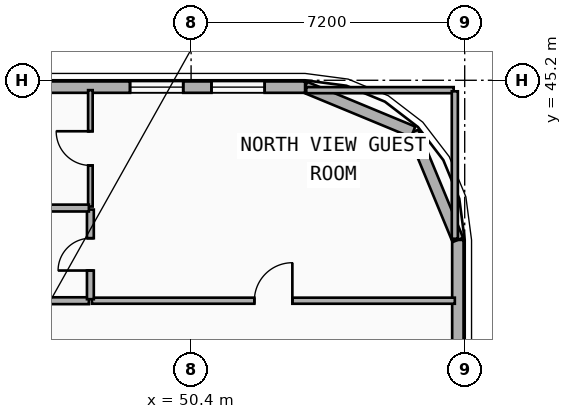
"""IFC4 building model, lengths in metres.
Left out: names, types, materials, properties, quantities, classifications, styles, units other than length and angle.
Written with IfcOpenShell. Run it as: python <this file> out.ifc"""

import sys

from ifc_helpers import new_model, si_unit, direction, frame, frame_2d, origin, place, context, subcontext, project, spatial, rectangle, extrude, element, fill, save


model = new_model("IFC4")
c1 = context("Model", 3, precision=1e-05, world=origin(), true_north=direction((0.0, 1.0)))
c2 = subcontext(c1, "Body", "Model", "MODEL_VIEW")
j1 = project(units=[si_unit("LENGTHUNIT", "METRE"), si_unit("PLANEANGLEUNIT", "RADIAN")], contexts=[c1])
p1 = place(None, origin())
s1 = spatial("IfcSite", under=j1, at=p1, CompositionType="ELEMENT")
p2 = place(p1, origin())
s2 = spatial("IfcBuilding", under=s1, at=p2, CompositionType="ELEMENT")
p3 = place(p2, frame((0.0, 0.0, 39.5)))
s3 = spatial("IfcBuildingStorey", under=s2, at=p3, CompositionType="ELEMENT", Elevation=39.5)
p4 = place(p3, frame((57.42, 41.0, 0.0), z_axis=(0.0, 0.0, 1.0), x_axis=(0.0, -1.0, 0.0)))
e1 = element("IfcWall", 1, at=p4, inside=s3, PredefinedType="SOLIDWALL", context=c2, shape_type="SweptSolid", body=[
    extrude(rectangle(XDim=15.2, YDim=0.3, at=frame_2d((7.6, 0.0))), origin(), (0.0, 0.0, 1.0), 3.24),
])
p5 = place(p4, frame((10.882, 0.0, 0.48)))
e2 = element("IfcOpeningElement", 2, at=p5, cuts=e1, PredefinedType="OPENING", context=c2, shape_type="SweptSolid", body=[
    extrude(rectangle(XDim=1.4, YDim=1.8, at=frame_2d((0.7, 0.9))), frame((0.0, 0.16, 0.0), z_axis=(0.0, -1.0, 0.0), x_axis=(1.0, 0.0, 0.0)), (0.0, 0.0, 1.0), 0.32),
])
p6 = place(p4, frame((5.621, 0.0, 0.48)))
e3 = element("IfcOpeningElement", 3, at=p6, cuts=e1, PredefinedType="OPENING", context=c2, shape_type="SweptSolid", body=[
    extrude(rectangle(XDim=1.4, YDim=1.8, at=frame_2d((0.7, 0.9))), frame((0.0, 0.16, 0.0), z_axis=(0.0, -1.0, 0.0), x_axis=(1.0, 0.0, 0.0)), (0.0, 0.0, 1.0), 0.32),
])
p7 = place(p3, frame((56.243, 43.843, 0.0), z_axis=(0.0, 0.0, 1.0), x_axis=(0.382636798336, -0.92389884758, 0.0)))
e4 = element("IfcWall", 4, at=p7, inside=s3, PredefinedType="SOLIDWALL", context=c2, shape_type="SweptSolid", body=[
    extrude(rectangle(XDim=3.077, YDim=0.3, at=frame_2d((1.538, 0.0))), origin(), (0.0, 0.0, 1.0), 3.24),
])
p8 = place(p3, frame((53.4, 45.02, 0.0), z_axis=(0.0, 0.0, 1.0), x_axis=(0.923882414032, -0.382676475685, 0.0)))
e5 = element("IfcWall", 5, at=p8, inside=s3, PredefinedType="SOLIDWALL", context=c2, shape_type="SweptSolid", body=[
    extrude(rectangle(XDim=3.077, YDim=0.3, at=frame_2d((1.539, 0.0))), origin(), (0.0, 0.0, 1.0), 3.24),
])
p9 = place(p3, frame((4.2, 45.02, 0.0), z_axis=(0.0, 0.0, 1.0), x_axis=(1.0, 0.0, 0.0)))
e6 = element("IfcWall", 6, at=p9, inside=s3, PredefinedType="SOLIDWALL", context=c2, shape_type="SweptSolid", body=[
    extrude(rectangle(XDim=49.2, YDim=0.3, at=frame_2d((24.6, 0.0))), origin(), (0.0, 0.0, 1.0), 3.24),
])
p10 = place(p9, frame((5.87, 0.0, 0.85)))
e7 = element("IfcOpeningElement", 7, at=p10, cuts=e6, PredefinedType="OPENING", context=c2, shape_type="SweptSolid", body=[
    extrude(rectangle(XDim=1.4, YDim=1.8, at=frame_2d((0.7, 0.9))), frame((0.0, 0.16, 0.0), z_axis=(0.0, -1.0, 0.0), x_axis=(1.0, 0.0, 0.0)), (0.0, 0.0, 1.0), 0.32),
])
p11 = place(p9, frame((8.481, 0.0, 0.85)))
e8 = element("IfcOpeningElement", 8, at=p11, cuts=e6, PredefinedType="OPENING", context=c2, shape_type="SweptSolid", body=[
    extrude(rectangle(XDim=1.4, YDim=1.8, at=frame_2d((0.7, 0.9))), frame((0.0, 0.16, 0.0), z_axis=(0.0, -1.0, 0.0), x_axis=(1.0, 0.0, 0.0)), (0.0, 0.0, 1.0), 0.32),
])
p12 = place(p9, frame((18.227, 0.0, 0.85)))
e9 = element("IfcOpeningElement", 9, at=p12, cuts=e6, PredefinedType="OPENING", context=c2, shape_type="SweptSolid", body=[
    extrude(rectangle(XDim=1.4, YDim=1.8, at=frame_2d((0.7, 0.9))), frame((0.0, 0.16, 0.0), z_axis=(0.0, -1.0, 0.0), x_axis=(1.0, 0.0, 0.0)), (0.0, 0.0, 1.0), 0.32),
])
p13 = place(p9, frame((21.462, 0.0, 0.85)))
e10 = element("IfcOpeningElement", 10, at=p13, cuts=e6, PredefinedType="OPENING", context=c2, shape_type="SweptSolid", body=[
    extrude(rectangle(XDim=1.4, YDim=1.8, at=frame_2d((0.7, 0.9))), frame((0.0, 0.16, 0.0), z_axis=(0.0, -1.0, 0.0), x_axis=(1.0, 0.0, 0.0)), (0.0, 0.0, 1.0), 0.32),
])
p14 = place(p9, frame((27.884, 0.0, 0.85)))
e11 = element("IfcOpeningElement", 11, at=p14, cuts=e6, PredefinedType="OPENING", context=c2, shape_type="SweptSolid", body=[
    extrude(rectangle(XDim=1.4, YDim=1.8, at=frame_2d((0.7, 0.9))), frame((0.0, 0.16, 0.0), z_axis=(0.0, -1.0, 0.0), x_axis=(1.0, 0.0, 0.0)), (0.0, 0.0, 1.0), 0.32),
])
p15 = place(p9, frame((29.867, 0.0, 0.85)))
e12 = element("IfcOpeningElement", 12, at=p15, cuts=e6, PredefinedType="OPENING", context=c2, shape_type="SweptSolid", body=[
    extrude(rectangle(XDim=1.4, YDim=1.8, at=frame_2d((0.7, 0.9))), frame((0.0, 0.16, 0.0), z_axis=(0.0, -1.0, 0.0), x_axis=(1.0, 0.0, 0.0)), (0.0, 0.0, 1.0), 0.32),
])
p16 = place(p9, frame((33.55, 0.0, 0.85)))
e13 = element("IfcOpeningElement", 13, at=p16, cuts=e6, PredefinedType="OPENING", context=c2, shape_type="SweptSolid", body=[
    extrude(rectangle(XDim=1.4, YDim=1.8, at=frame_2d((0.7, 0.9))), frame((0.0, 0.16, 0.0), z_axis=(0.0, -1.0, 0.0), x_axis=(1.0, 0.0, 0.0)), (0.0, 0.0, 1.0), 0.32),
])
p17 = place(p9, frame((36.05, 0.0, 0.85)))
e14 = element("IfcOpeningElement", 14, at=p17, cuts=e6, PredefinedType="OPENING", context=c2, shape_type="SweptSolid", body=[
    extrude(rectangle(XDim=1.4, YDim=1.8, at=frame_2d((0.7, 0.9))), frame((0.0, 0.16, 0.0), z_axis=(0.0, -1.0, 0.0), x_axis=(1.0, 0.0, 0.0)), (0.0, 0.0, 1.0), 0.32),
])
p18 = place(p9, frame((44.593, 0.0, 0.85)))
e15 = element("IfcOpeningElement", 15, at=p18, cuts=e6, PredefinedType="OPENING", context=c2, shape_type="SweptSolid", body=[
    extrude(rectangle(XDim=1.4, YDim=1.8, at=frame_2d((0.7, 0.9))), frame((0.0, 0.16, 0.0), z_axis=(0.0, -1.0, 0.0), x_axis=(1.0, 0.0, 0.0)), (0.0, 0.0, 1.0), 0.32),
])
p19 = place(p9, frame((46.737, 0.0, 0.85)))
e16 = element("IfcOpeningElement", 16, at=p19, cuts=e6, PredefinedType="OPENING", context=c2, shape_type="SweptSolid", body=[
    extrude(rectangle(XDim=1.4, YDim=1.8, at=frame_2d((0.7, 0.9))), frame((0.0, 0.16, 0.0), z_axis=(0.0, -1.0, 0.0), x_axis=(1.0, 0.0, 0.0)), (0.0, 0.0, 1.0), 0.32),
])
p20 = place(p3, frame((47.79, 39.4, 0.0), z_axis=(0.0, 0.0, 1.0), x_axis=(1.0, 0.0, 0.0)))
e17 = element("IfcWall", 17, at=p20, inside=s3, PredefinedType="PARTITIONING", context=c2, shape_type="SweptSolid", body=[
    extrude(rectangle(XDim=9.55, YDim=0.16, at=frame_2d((4.775, 0.0))), origin(), (0.0, 0.0, 1.0), 3.24),
])
p21 = place(p20, frame((4.275, 0.0, 0.0)))
e18 = element("IfcOpeningElement", 18, at=p21, cuts=e17, PredefinedType="OPENING", context=c2, shape_type="SweptSolid", body=[
    extrude(rectangle(XDim=1.0, YDim=2.15, at=frame_2d((0.5, 1.075))), frame((0.0, 0.09, 0.0), z_axis=(0.0, -1.0, 0.0), x_axis=(1.0, 0.0, 0.0)), (0.0, 0.0, 1.0), 0.18),
])
p22 = place(p3, frame((45.44, 39.4, 0.0), z_axis=(0.0, 0.0, 1.0), x_axis=(1.0, 0.0, 0.0)))
e19 = element("IfcWall", 19, at=p22, inside=s3, PredefinedType="PLUMBINGWALL", context=c2, shape_type="SweptSolid", body=[
    extrude(rectangle(XDim=2.27, YDim=0.18, at=frame_2d((1.135, 0.0))), origin(), (0.0, 0.0, 1.0), 3.24),
])
p23 = place(p3, frame((47.75, 39.44, 0.0), z_axis=(0.0, 0.0, 1.0), x_axis=(0.0, 1.0, 0.0)))
e20 = element("IfcWall", 20, at=p23, inside=s3, PredefinedType="PLUMBINGWALL", context=c2, shape_type="SweptSolid", body=[
    extrude(rectangle(XDim=2.358, YDim=0.18, at=frame_2d((1.179, 0.0))), origin(), (0.0, 0.0, 1.0), 3.24),
])
p24 = place(p23, frame((0.754, 0.0, 0.0)))
e21 = element("IfcOpeningElement", 21, at=p24, cuts=e20, PredefinedType="OPENING", context=c2, shape_type="SweptSolid", body=[
    extrude(rectangle(XDim=0.85, YDim=2.1, at=frame_2d((0.425, 1.05))), frame((0.0, 0.1, 0.0), z_axis=(0.0, -1.0, 0.0), x_axis=(1.0, 0.0, 0.0)), (0.0, 0.0, 1.0), 0.2),
])
p25 = place(p3, frame((47.75, 41.878, 0.0), z_axis=(0.0, 0.0, 1.0), x_axis=(0.0, 1.0, 0.0)))
e22 = element("IfcWall", 22, at=p25, inside=s3, PredefinedType="PARTITIONING", context=c2, shape_type="SweptSolid", body=[
    extrude(rectangle(XDim=3.062, YDim=0.12, at=frame_2d((1.531, 0.0))), origin(), (0.0, 0.0, 1.0), 3.24),
])
p26 = place(p25, frame((1.081, 0.0, 0.0)))
e23 = element("IfcOpeningElement", 23, at=p26, cuts=e22, PredefinedType="OPENING", context=c2, shape_type="SweptSolid", body=[
    extrude(rectangle(XDim=0.9, YDim=2.1, at=frame_2d((0.45, 1.05))), frame((0.0, 0.07, 0.0), z_axis=(0.0, -1.0, 0.0), x_axis=(1.0, 0.0, 0.0)), (0.0, 0.0, 1.0), 0.14),
])
p27 = place(p3, frame((45.44, 41.838, 0.0), z_axis=(0.0, 0.0, 1.0), x_axis=(1.0, 0.0, 0.0)))
e24 = element("IfcWall", 24, at=p27, inside=s3, PredefinedType="PLUMBINGWALL", context=c2, shape_type="SweptSolid", body=[
    extrude(rectangle(XDim=2.27, YDim=0.18, at=frame_2d((1.135, 0.0))), origin(), (0.0, 0.0, 1.0), 3.24),
])
p28 = place(p3, frame((53.43, 44.94, 0.0), z_axis=(0.0, 0.0, 1.0), x_axis=(1.0, 0.0, 0.0)))
e25 = element("IfcWall", 25, at=p28, inside=s3, PredefinedType="PARTITIONING", context=c2, shape_type="SweptSolid", body=[
    extrude(rectangle(XDim=3.88, YDim=0.16, at=frame_2d((1.94, 0.0))), origin(), (0.0, 0.0, 1.0), 3.24),
])
p29 = place(p3, frame((57.34, 41.03, 0.0), z_axis=(0.0, 0.0, 1.0), x_axis=(0.0, 1.0, 0.0)))
e26 = element("IfcWall", 26, at=p29, inside=s3, PredefinedType="PARTITIONING", context=c2, shape_type="SweptSolid", body=[
    extrude(rectangle(XDim=3.88, YDim=0.16, at=frame_2d((1.94, 0.0))), origin(), (0.0, 0.0, 1.0), 3.24),
])
p30 = place(p18, origin())
e27 = element("IfcWindow", 27, at=p30, inside=s3, PartitioningType="SINGLE_PANEL", PredefinedType="WINDOW", context=c2, shape_type="SweptSolid", body=[
    extrude(rectangle(XDim=1.4, YDim=1.8, at=frame_2d((0.7, 0.9))), frame((0.0, 0.03, 0.0), z_axis=(0.0, -1.0, 0.0), x_axis=(1.0, 0.0, 0.0)), (0.0, 0.0, 1.0), 0.06),
])
fill(e15, e27)
p31 = place(p19, origin())
e28 = element("IfcWindow", 28, at=p31, inside=s3, PartitioningType="SINGLE_PANEL", PredefinedType="WINDOW", context=c2, shape_type="SweptSolid", body=[
    extrude(rectangle(XDim=1.4, YDim=1.8, at=frame_2d((0.7, 0.9))), frame((0.0, 0.03, 0.0), z_axis=(0.0, -1.0, 0.0), x_axis=(1.0, 0.0, 0.0)), (0.0, 0.0, 1.0), 0.06),
])
fill(e16, e28)
p32 = place(p21, origin())
e29 = element("IfcDoor", 29, at=p32, inside=s3, OperationType="SINGLE_SWING_RIGHT", PredefinedType="DOOR", context=c2, shape_type="SweptSolid", body=[
    extrude(rectangle(XDim=1.0, YDim=2.15, at=frame_2d((0.5, 1.075))), frame((0.0, 0.025, 0.0), z_axis=(0.0, -1.0, 0.0), x_axis=(1.0, 0.0, 0.0)), (0.0, 0.0, 1.0), 0.05),
])
fill(e18, e29)
p33 = place(p24, origin())
e30 = element("IfcDoor", 30, at=p33, inside=s3, OperationType="SINGLE_SWING_LEFT", PredefinedType="DOOR", context=c2, shape_type="SweptSolid", body=[
    extrude(rectangle(XDim=0.85, YDim=2.1, at=frame_2d((0.425, 1.05))), frame((0.0, 0.025, 0.0), z_axis=(0.0, -1.0, 0.0), x_axis=(1.0, 0.0, 0.0)), (0.0, 0.0, 1.0), 0.05),
])
fill(e21, e30)
p34 = place(p26, origin())
e31 = element("IfcDoor", 31, at=p34, inside=s3, OperationType="SINGLE_SWING_RIGHT", PredefinedType="DOOR", context=c2, shape_type="SweptSolid", body=[
    extrude(rectangle(XDim=0.9, YDim=2.1, at=frame_2d((0.45, 1.05))), frame((0.0, 0.025, 0.0), z_axis=(0.0, -1.0, 0.0), x_axis=(1.0, 0.0, 0.0)), (0.0, 0.0, 1.0), 0.05),
])
fill(e23, e31)
save(model, sys.argv[1])
